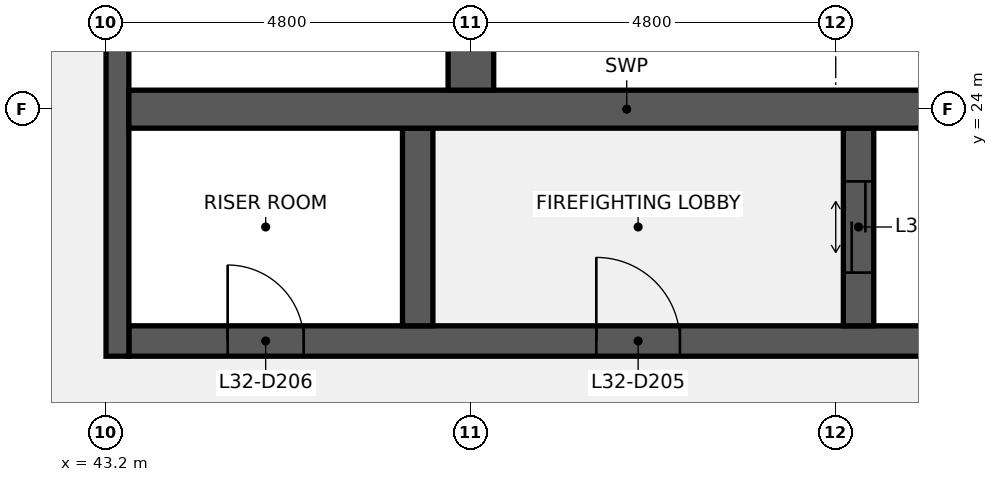
"""IFC4 building model, lengths in metres.
Left out: names, types, materials, properties, quantities, classifications, styles, units other than length and angle.
Written with IfcOpenShell. Run it as: python <this file> out.ifc"""

import sys

from ifc_helpers import new_model, si_unit, direction, frame, frame_2d, origin, place, context, subcontext, project, spatial, rectangle, extrude, element, fill, save


model = new_model("IFC4")
c1 = context("Model", 3, precision=1e-05, world=origin(), true_north=direction((0.0, 1.0)))
c2 = subcontext(c1, "Body", "Model", "MODEL_VIEW")
j1 = project(units=[si_unit("LENGTHUNIT", "METRE"), si_unit("PLANEANGLEUNIT", "RADIAN")], contexts=[c1])
p1 = place(None, origin())
s1 = spatial("IfcSite", under=j1, at=p1, CompositionType="ELEMENT")
p2 = place(p1, origin())
s2 = spatial("IfcBuilding", under=s1, at=p2, CompositionType="ELEMENT")
p3 = place(p2, frame((0.0, 0.0, 148.1)))
s3 = spatial("IfcBuildingStorey", under=s2, at=p3, CompositionType="ELEMENT", Elevation=148.1)
p4 = place(p3, frame((43.5, 20.95, 0.0), z_axis=(0.0, 0.0, 1.0), x_axis=(1.0, 0.0, 0.0)))
e1 = element("IfcWall", 1, at=p4, inside=s3, PredefinedType="SHEAR", context=c2, shape_type="SweptSolid", body=[
    extrude(rectangle(XDim=13.1, YDim=0.4, at=frame_2d((6.55, 0.0))), origin(), (0.0, 0.0, 1.0), 3.84),
])
p5 = place(p4, frame((6.15, 0.0, 0.0)))
e2 = element("IfcOpeningElement", 2, at=p5, cuts=e1, PredefinedType="OPENING", context=c2, shape_type="SweptSolid", body=[
    extrude(rectangle(XDim=1.1, YDim=2.1, at=frame_2d((0.55, 1.05))), frame((0.0, 0.21, 0.0), z_axis=(0.0, -1.0, 0.0), x_axis=(1.0, 0.0, 0.0)), (0.0, 0.0, 1.0), 0.42),
])
p6 = place(p4, frame((1.3, 0.0, 0.0)))
e3 = element("IfcOpeningElement", 3, at=p6, cuts=e1, PredefinedType="OPENING", context=c2, shape_type="SweptSolid", body=[
    extrude(rectangle(XDim=1.0, YDim=2.1, at=frame_2d((0.5, 1.05))), frame((0.0, 0.21, 0.0), z_axis=(0.0, -1.0, 0.0), x_axis=(1.0, 0.0, 0.0)), (0.0, 0.0, 1.0), 0.42),
])
p7 = place(p3, frame((43.35, 20.75, 0.0), z_axis=(0.0, 0.0, 1.0), x_axis=(0.0, 1.0, 0.0)))
e4 = element("IfcWall", 4, at=p7, inside=s3, PredefinedType="SHEAR", context=c2, shape_type="SweptSolid", body=[
    extrude(rectangle(XDim=6.5, YDim=0.3, at=frame_2d((3.25, 0.0))), origin(), (0.0, 0.0, 1.0), 3.84),
])
p8 = place(p3, frame((53.1, 21.15, 0.0), z_axis=(0.0, 0.0, 1.0), x_axis=(0.0, 1.0, 0.0)))
e5 = element("IfcWall", 5, at=p8, inside=s3, PredefinedType="SHEAR", context=c2, shape_type="SweptSolid", body=[
    extrude(rectangle(XDim=2.6, YDim=0.4, at=frame_2d((1.3, 0.0))), origin(), (0.0, 0.0, 1.0), 3.84),
])
p9 = place(p8, frame((0.7, 0.0, 0.0)))
e6 = element("IfcOpeningElement", 6, at=p9, cuts=e5, PredefinedType="OPENING", context=c2, shape_type="SweptSolid", body=[
    extrude(rectangle(XDim=1.2, YDim=2.1, at=frame_2d((0.6, 1.05))), frame((0.0, 0.21, 0.0), z_axis=(0.0, -1.0, 0.0), x_axis=(1.0, 0.0, 0.0)), (0.0, 0.0, 1.0), 0.42),
])
p10 = place(p3, frame((47.3, 21.15, 0.0), z_axis=(0.0, 0.0, 1.0), x_axis=(0.0, 1.0, 0.0)))
e7 = element("IfcWall", 7, at=p10, inside=s3, PredefinedType="SHEAR", context=c2, shape_type="SweptSolid", body=[
    extrude(rectangle(XDim=2.6, YDim=0.4, at=frame_2d((1.3, 0.0))), origin(), (0.0, 0.0, 1.0), 3.84),
])
p11 = place(p3, frame((43.5, 24.0, 0.0), z_axis=(0.0, 0.0, 1.0), x_axis=(1.0, 0.0, 0.0)))
e8 = element("IfcWall", 8, at=p11, inside=s3, PredefinedType="SHEAR", context=c2, shape_type="SweptSolid", body=[
    extrude(rectangle(XDim=13.1, YDim=0.5, at=frame_2d((6.55, 0.0))), origin(), (0.0, 0.0, 1.0), 3.84),
])
p12 = place(p3, frame((48.0, 24.25, 0.0), z_axis=(0.0, 0.0, 1.0), x_axis=(0.0, 1.0, 0.0)))
e9 = element("IfcWall", 9, at=p12, inside=s3, PredefinedType="SHEAR", context=c2, shape_type="SweptSolid", body=[
    extrude(rectangle(XDim=2.6, YDim=0.6, at=frame_2d((1.3, 0.0))), origin(), (0.0, 0.0, 1.0), 3.84),
])
p13 = place(p5, origin())
e10 = element("IfcDoor", 10, at=p13, inside=s3, OperationType="SINGLE_SWING_LEFT", PredefinedType="DOOR", context=c2, shape_type="SweptSolid", body=[
    extrude(rectangle(XDim=1.1, YDim=2.1, at=frame_2d((0.55, 1.05))), frame((0.0, 0.025, 0.0), z_axis=(0.0, -1.0, 0.0), x_axis=(1.0, 0.0, 0.0)), (0.0, 0.0, 1.0), 0.05),
])
fill(e2, e10)
p14 = place(p6, origin())
e11 = element("IfcDoor", 11, at=p14, inside=s3, OperationType="SINGLE_SWING_LEFT", PredefinedType="DOOR", context=c2, shape_type="SweptSolid", body=[
    extrude(rectangle(XDim=1.0, YDim=2.1, at=frame_2d((0.5, 1.05))), frame((0.0, 0.025, 0.0), z_axis=(0.0, -1.0, 0.0), x_axis=(1.0, 0.0, 0.0)), (0.0, 0.0, 1.0), 0.05),
])
fill(e3, e11)
p15 = place(p9, origin())
e12 = element("IfcDoor", 12, at=p15, inside=s3, OperationType="DOUBLE_DOOR_SLIDING", PredefinedType="DOOR", context=c2, shape_type="SweptSolid", body=[
    extrude(rectangle(XDim=1.2, YDim=2.1, at=frame_2d((0.6, 1.05))), frame((0.0, 0.025, 0.0), z_axis=(0.0, -1.0, 0.0), x_axis=(1.0, 0.0, 0.0)), (0.0, 0.0, 1.0), 0.05),
])
fill(e6, e12)
save(model, sys.argv[1])
